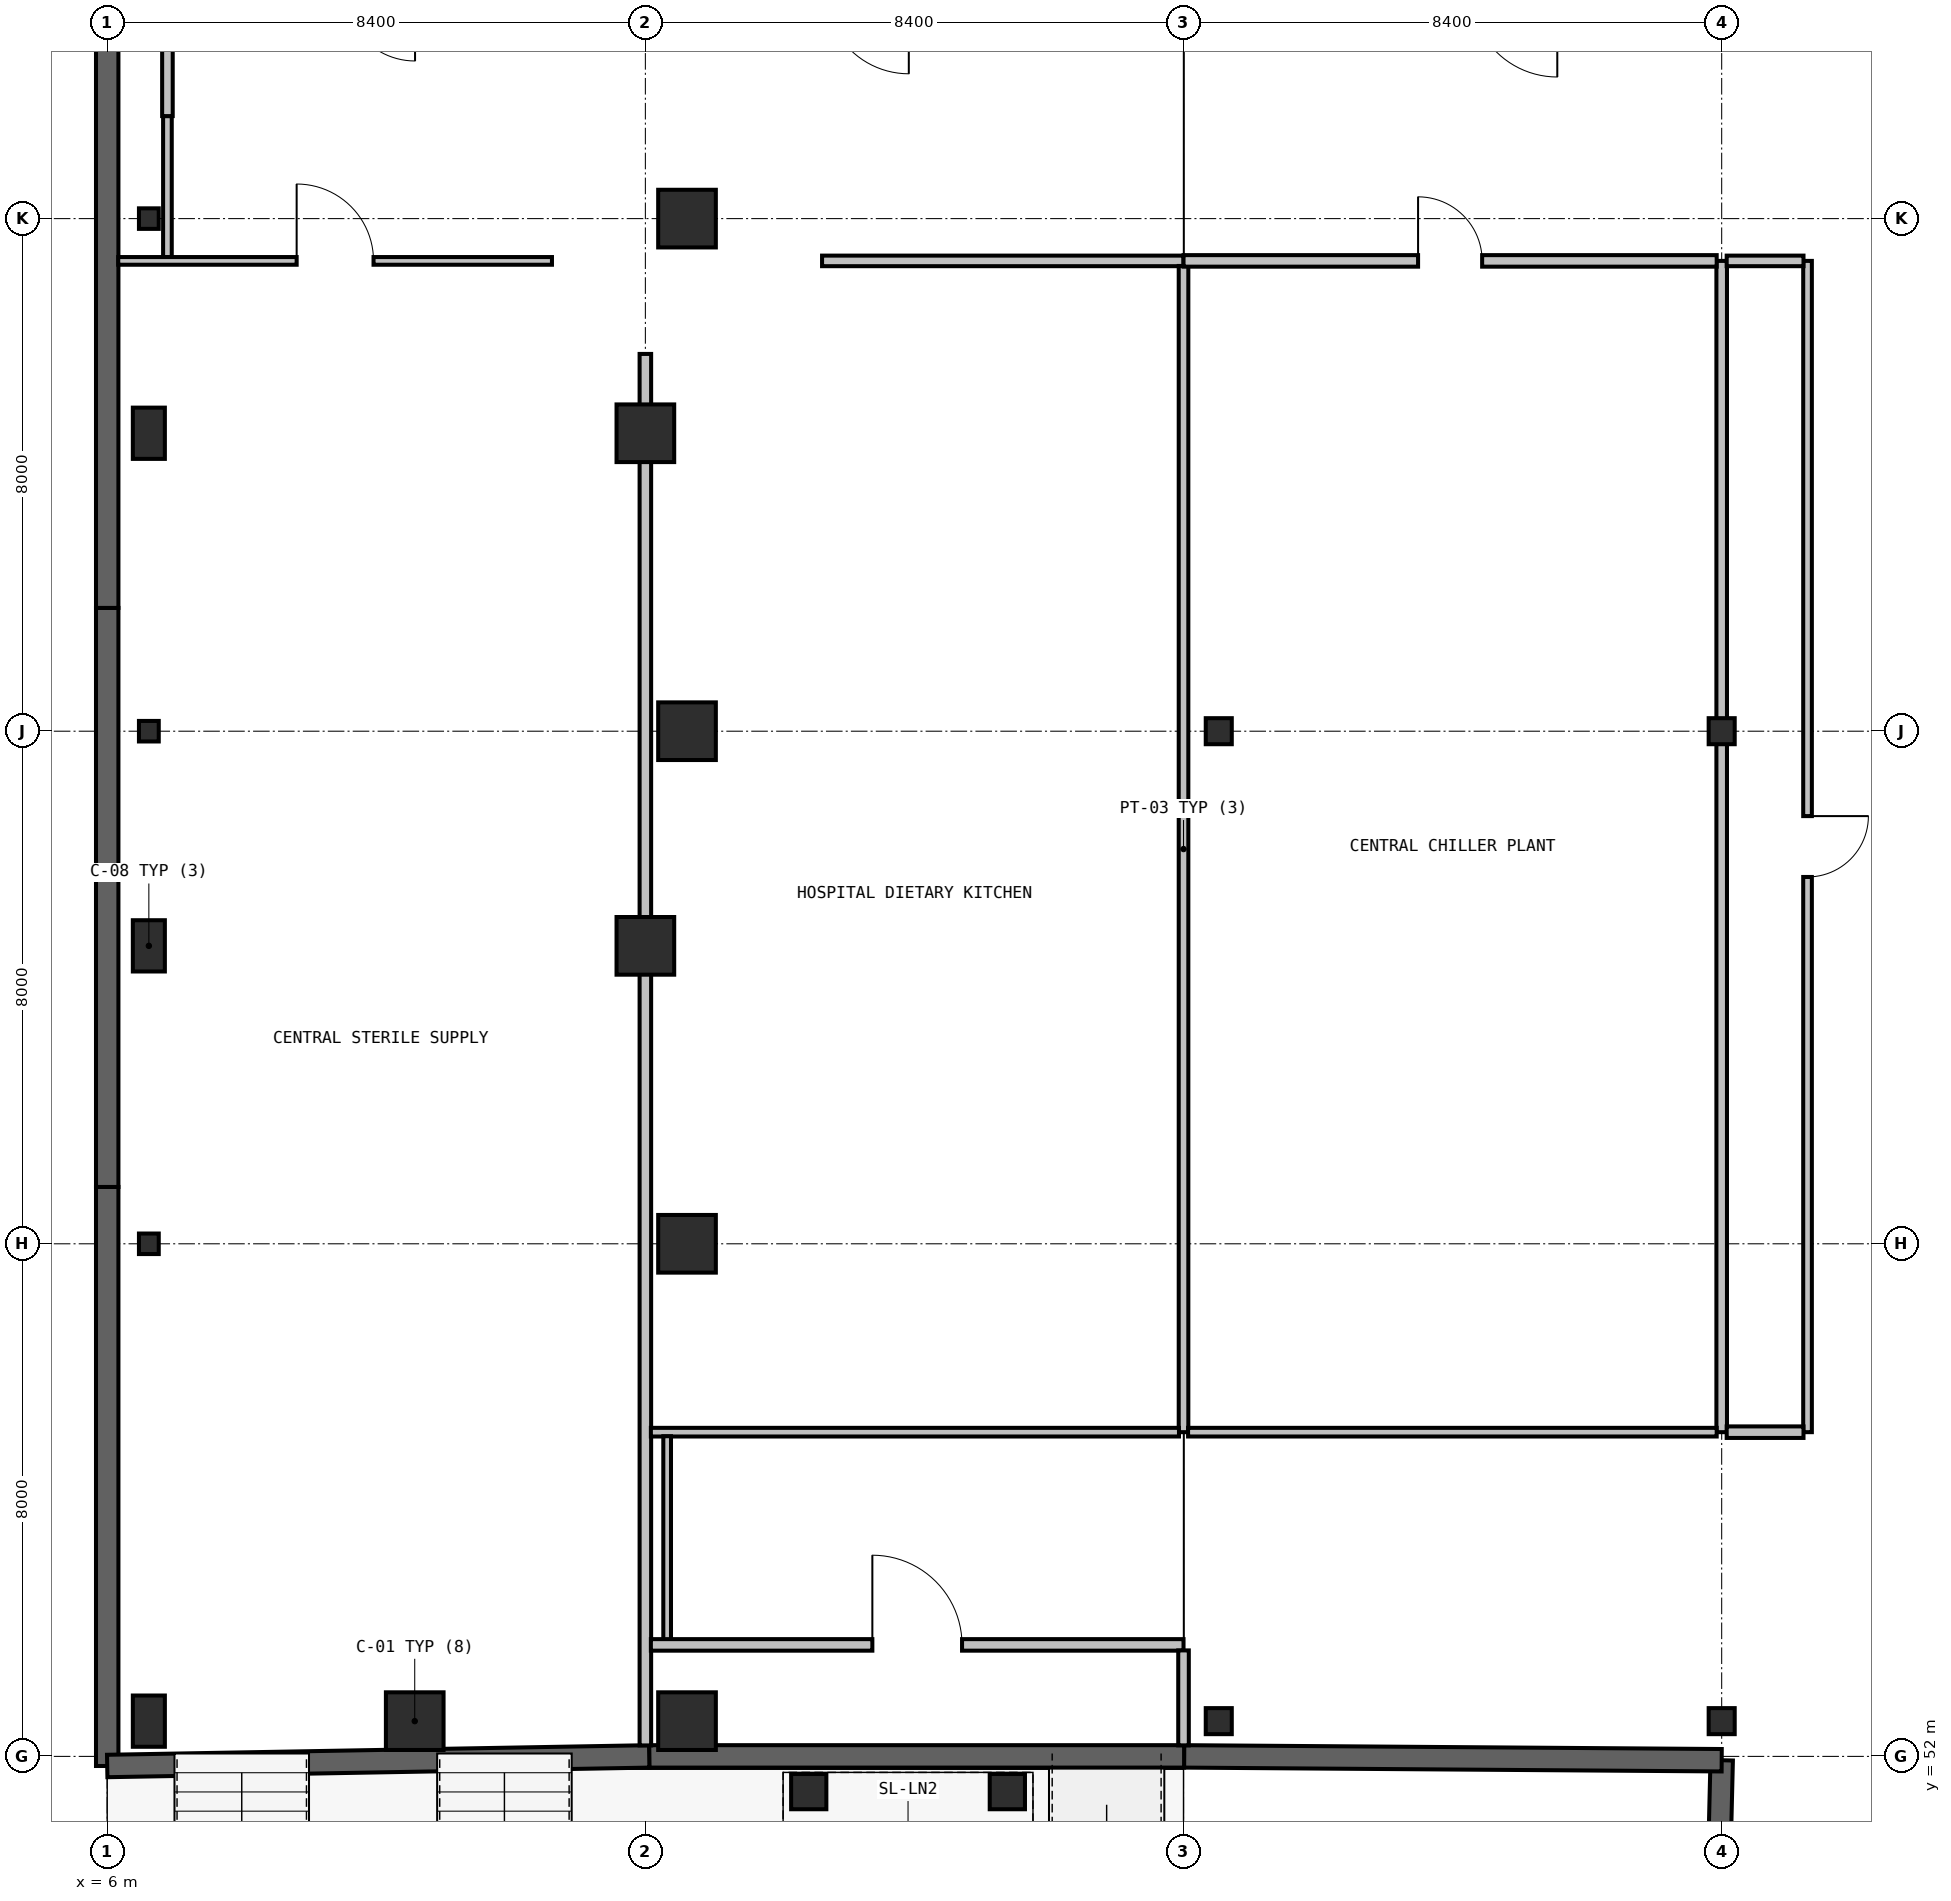
"""IFC4 building model, lengths in metres.
Left out: names, types, materials, properties, quantities, classifications, styles, units other than length and angle.
Written with IfcOpenShell. Run it as: python <this file> out.ifc"""

import sys

from ifc_helpers import new_model, si_unit, direction, frame, frame_2d, origin, origin_2d, place, context, subcontext, project, spatial, rectangle, hollow_circle, i_section, extrude, element, fill, save


model = new_model("IFC4")
c1 = context("Model", 3, precision=1e-05, world=origin(), true_north=direction((0.0, 1.0)))
c2 = subcontext(c1, "Body", "Model", "MODEL_VIEW")
j1 = project(units=[si_unit("LENGTHUNIT", "METRE"), si_unit("PLANEANGLEUNIT", "RADIAN")], contexts=[c1])
p1 = place(None, origin())
s1 = spatial("IfcSite", under=j1, at=p1, CompositionType="ELEMENT")
p2 = place(p1, origin())
s2 = spatial("IfcBuilding", under=s1, at=p2, CompositionType="ELEMENT")
p3 = place(p2, frame((0.0, 0.0, -4.8)))
s3 = spatial("IfcBuildingStorey", under=s2, at=p3, CompositionType="ELEMENT", Elevation=-4.8)
for number, where, z_axis, x_axis in (
    (1, (23.35, 52.55, 0.0), (0.0, 0.0, 1.0), (1.0, 0.0, 0.0)),
    (2, (23.35, 68.0, 0.0), (0.0, 0.0, 1.0), (1.0, 0.0, 0.0)),
    (3, (31.2, 52.55, 0.0), (0.0, 0.0, 1.0), (1.0, 0.0, 0.0)),
    (4, (31.2, 68.0, 0.0), (0.0, 0.0, 1.0), (1.0, 0.0, 0.0)),
):
    element("IfcColumn", number, at=place(p3, frame(where, z_axis=z_axis, x_axis=x_axis)), inside=s3, PredefinedType="COLUMN", context=c2, shape_type="SweptSolid", body=[
        extrude(hollow_circle(Radius=0.203, WallThickness=0.016, at=origin_2d()), origin(), (0.0, 0.0, 1.0), 4.8),
    ])
p4 = place(p3, frame((15.05, 52.55, 0.0), z_axis=(0.0, 0.0, 1.0), x_axis=(1.0, 0.0, 0.0)))
e5 = element("IfcColumn", 5, at=p4, inside=s3, PredefinedType="COLUMN", context=c2, shape_type="SweptSolid", body=[
    extrude(rectangle(XDim=0.9, YDim=0.9, at=origin_2d()), origin(), (0.0, 0.0, 1.0), 4.8),
])
p5 = place(p3, frame((6.65, 60.0, 0.0), z_axis=(0.0, 0.0, 1.0), x_axis=(1.0, 0.0, 0.0)))
e6 = element("IfcColumn", 6, at=p5, inside=s3, PredefinedType="COLUMN", context=c2, shape_type="SweptSolid", body=[
    extrude(i_section(OverallWidth=0.309, OverallDepth=0.321, WebThickness=0.014, FlangeThickness=0.022, at=origin_2d()), origin(), (0.0, 0.0, 1.0), 4.8),
])
p6 = place(p3, frame((15.05, 60.0, 0.0), z_axis=(0.0, 0.0, 1.0), x_axis=(1.0, 0.0, 0.0)))
e7 = element("IfcColumn", 7, at=p6, inside=s3, PredefinedType="COLUMN", context=c2, shape_type="SweptSolid", body=[
    extrude(rectangle(XDim=0.9, YDim=0.9, at=origin_2d()), origin(), (0.0, 0.0, 1.0), 4.8),
])
p7 = place(p3, frame((6.65, 68.0, 0.0), z_axis=(0.0, 0.0, 1.0), x_axis=(1.0, 0.0, 0.0)))
e8 = element("IfcColumn", 8, at=p7, inside=s3, PredefinedType="COLUMN", context=c2, shape_type="SweptSolid", body=[
    extrude(i_section(OverallWidth=0.309, OverallDepth=0.321, WebThickness=0.014, FlangeThickness=0.022, at=origin_2d()), origin(), (0.0, 0.0, 1.0), 4.8),
])
p8 = place(p3, frame((15.05, 68.0, 0.0), z_axis=(0.0, 0.0, 1.0), x_axis=(1.0, 0.0, 0.0)))
e9 = element("IfcColumn", 9, at=p8, inside=s3, PredefinedType="COLUMN", context=c2, shape_type="SweptSolid", body=[
    extrude(rectangle(XDim=0.9, YDim=0.9, at=origin_2d()), origin(), (0.0, 0.0, 1.0), 4.8),
])
p9 = place(p3, frame((6.65, 76.0, 0.0), z_axis=(0.0, 0.0, 1.0), x_axis=(1.0, 0.0, 0.0)))
e10 = element("IfcColumn", 10, at=p9, inside=s3, PredefinedType="COLUMN", context=c2, shape_type="SweptSolid", body=[
    extrude(i_section(OverallWidth=0.309, OverallDepth=0.321, WebThickness=0.014, FlangeThickness=0.022, at=origin_2d()), origin(), (0.0, 0.0, 1.0), 4.8),
])
p10 = place(p3, frame((15.05, 76.0, 0.0), z_axis=(0.0, 0.0, 1.0), x_axis=(1.0, 0.0, 0.0)))
e11 = element("IfcColumn", 11, at=p10, inside=s3, PredefinedType="COLUMN", context=c2, shape_type="SweptSolid", body=[
    extrude(rectangle(XDim=0.9, YDim=0.9, at=origin_2d()), origin(), (0.0, 0.0, 1.0), 4.8),
])
p11 = place(p3, frame((6.65, 52.55, 0.0), z_axis=(0.0, 0.0, 1.0), x_axis=(1.0, 0.0, 0.0)))
e12 = element("IfcColumn", 12, at=p11, inside=s3, PredefinedType="COLUMN", context=c2, shape_type="SweptSolid", body=[
    extrude(rectangle(XDim=0.5, YDim=0.8, at=origin_2d()), origin(), (0.0, 0.0, 1.0), 4.555),
])
p12 = place(p3, frame((10.8, 52.55, 0.0), z_axis=(0.0, 0.0, 1.0), x_axis=(1.0, 0.0, 0.0)))
e13 = element("IfcColumn", 13, at=p12, inside=s3, PredefinedType="COLUMN", context=c2, shape_type="SweptSolid", body=[
    extrude(rectangle(XDim=0.9, YDim=0.9, at=origin_2d()), origin(), (0.0, 0.0, 1.0), 4.555),
])
for number, where, z_axis, x_axis in (
    (14, (16.95, 51.45, -0.245), (0.0, 0.0, 1.0), (1.0, 0.0, 0.0)),
    (15, (20.05, 51.45, -0.245), (0.0, 0.0, 1.0), (1.0, 0.0, 0.0)),
):
    element("IfcColumn", number, at=place(p3, frame(where, z_axis=z_axis, x_axis=x_axis)), inside=s3, PredefinedType="COLUMN", context=c2, shape_type="SweptSolid", body=[
        extrude(rectangle(XDim=0.55, YDim=0.55, at=origin_2d()), origin(), (0.0, 0.0, 1.0), 2.425),
    ])
for number, where, z_axis, x_axis in (
    (16, (6.65, 64.65, 0.0), (0.0, 0.0, 1.0), (1.0, 0.0, 0.0)),
    (17, (6.65, 72.65, 0.0), (0.0, 0.0, 1.0), (1.0, 0.0, 0.0)),
):
    element("IfcColumn", number, at=place(p3, frame(where, z_axis=z_axis, x_axis=x_axis)), inside=s3, PredefinedType="COLUMN", context=c2, shape_type="SweptSolid", body=[
        extrude(rectangle(XDim=0.5, YDim=0.8, at=origin_2d()), origin(), (0.0, 0.0, 1.0), 4.555),
    ])
for number, where, z_axis, x_axis in (
    (18, (14.4, 64.65, 0.0), (0.0, 0.0, 1.0), (1.0, 0.0, 0.0)),
    (19, (14.4, 72.65, 0.0), (0.0, 0.0, 1.0), (1.0, 0.0, 0.0)),
):
    element("IfcColumn", number, at=place(p3, frame(where, z_axis=z_axis, x_axis=x_axis)), inside=s3, PredefinedType="COLUMN", context=c2, shape_type="SweptSolid", body=[
        extrude(rectangle(XDim=0.9, YDim=0.9, at=origin_2d()), origin(), (0.0, 0.0, 1.0), 4.45),
    ])
p13 = place(p3, frame((6.0, 51.85, 0.0), z_axis=(0.0, 0.0, 1.0), x_axis=(0.0, 1.0, 0.0)))
e20 = element("IfcWall", 20, at=p13, inside=s3, PredefinedType="SHEAR", context=c2, shape_type="SweptSolid", body=[
    extrude(rectangle(XDim=9.037, YDim=0.35, at=frame_2d((4.519, 0.0))), origin(), (0.0, 0.0, 1.0), 4.45),
])
p14 = place(p3, frame((6.0, 60.887, 0.0), z_axis=(0.0, 0.0, 1.0), x_axis=(0.0, 1.0, 0.0)))
e21 = element("IfcWall", 21, at=p14, inside=s3, PredefinedType="SHEAR", context=c2, shape_type="SweptSolid", body=[
    extrude(rectangle(XDim=9.037, YDim=0.35, at=frame_2d((4.519, 0.0))), origin(), (0.0, 0.0, 1.0), 4.45),
])
p15 = place(p3, frame((6.0, 69.924, 0.0), z_axis=(0.0, 0.0, 1.0), x_axis=(0.0, 1.0, 0.0)))
e22 = element("IfcWall", 22, at=p15, inside=s3, PredefinedType="SHEAR", context=c2, shape_type="SweptSolid", body=[
    extrude(rectangle(XDim=9.038, YDim=0.35, at=frame_2d((4.519, 0.0))), origin(), (0.0, 0.0, 1.0), 4.45),
])
p16 = place(p3, frame((31.17, 50.697, 0.0), z_axis=(0.0, 0.0, 1.0), x_axis=(0.024153234526, 0.999708268077, 0.0)))
e23 = element("IfcWall", 23, at=p16, inside=s3, PredefinedType="SHEAR", context=c2, shape_type="SweptSolid", body=[
    extrude(rectangle(XDim=1.243, YDim=0.35, at=frame_2d((0.622, 0.0))), origin(), (0.0, 0.0, 1.0), 4.45),
])
p17 = place(p3, frame((31.2, 51.94, 0.0), z_axis=(0.0, 0.0, 1.0), x_axis=(-0.999974385273, 0.007157429625, 0.0)))
e24 = element("IfcWall", 24, at=p17, inside=s3, PredefinedType="SHEAR", context=c2, shape_type="SweptSolid", body=[
    extrude(rectangle(XDim=8.391, YDim=0.35, at=frame_2d((4.196, 0.0))), origin(), (0.0, 0.0, 1.0), 4.45),
])
p18 = place(p3, frame((22.809, 52.0, 0.0), z_axis=(0.0, 0.0, 1.0), x_axis=(-1.0, 0.0, 0.0)))
e25 = element("IfcWall", 25, at=p18, inside=s3, PredefinedType="SHEAR", context=c2, shape_type="SweptSolid", body=[
    extrude(rectangle(XDim=8.349, YDim=0.35, at=frame_2d((4.175, 0.0))), origin(), (0.0, 0.0, 1.0), 4.45),
])
p19 = place(p3, frame((14.46, 52.0, 0.0), z_axis=(0.0, 0.0, 1.0), x_axis=(-0.999843054855, -0.01771625406, 0.0)))
e26 = element("IfcWall", 26, at=p19, inside=s3, PredefinedType="SHEAR", context=c2, shape_type="SweptSolid", body=[
    extrude(rectangle(XDim=8.461, YDim=0.35, at=frame_2d((4.23, 0.0))), origin(), (0.0, 0.0, 1.0), 4.45),
])
p20 = place(p3, frame((6.94, 77.6, 0.0), z_axis=(0.0, 0.0, 1.0), x_axis=(0.0, -1.0, 0.0)))
e27 = element("IfcWall", 27, at=p20, inside=s3, PredefinedType="PARTITIONING", context=c2, shape_type="SweptSolid", body=[
    extrude(rectangle(XDim=2.2, YDim=0.135, at=frame_2d((1.1, 0.0))), origin(), (0.0, 0.0, 1.0), 4.45),
])
p21 = place(p3, frame((6.172, 75.34, 0.0), z_axis=(0.0, 0.0, 1.0), x_axis=(1.0, 0.0, 0.0)))
e28 = element("IfcWall", 28, at=p21, inside=s3, PredefinedType="PARTITIONING", context=c2, shape_type="SweptSolid", body=[
    extrude(rectangle(XDim=6.77, YDim=0.12, at=frame_2d((3.385, 0.0))), origin(), (0.0, 0.0, 1.0), 4.45),
])
p22 = place(p21, frame((2.785, 0.0, 0.0)))
e29 = element("IfcOpeningElement", 29, at=p22, cuts=e28, PredefinedType="OPENING", context=c2, shape_type="SweptSolid", body=[
    extrude(rectangle(XDim=1.2, YDim=2.15, at=frame_2d((0.6, 1.075))), frame((0.0, 0.07, 0.0), z_axis=(0.0, -1.0, 0.0), x_axis=(1.0, 0.0, 0.0)), (0.0, 0.0, 1.0), 0.14),
])
p23 = place(p3, frame((14.4, 73.888, 0.0), z_axis=(0.0, 0.0, 1.0), x_axis=(0.0, -1.0, 0.0)))
e30 = element("IfcWall", 30, at=p23, inside=s3, PredefinedType="PARTITIONING", context=c2, shape_type="SweptSolid", body=[
    extrude(rectangle(XDim=21.717, YDim=0.18, at=frame_2d((10.858, 0.0))), origin(), (0.0, 0.0, 1.0), 4.45),
])
p24 = place(p3, frame((17.158, 75.34, 0.0), z_axis=(0.0, 0.0, 1.0), x_axis=(1.0, 0.0, 0.0)))
e31 = element("IfcWall", 31, at=p24, inside=s3, PredefinedType="PARTITIONING", context=c2, shape_type="SweptSolid", body=[
    extrude(rectangle(XDim=5.642, YDim=0.165, at=frame_2d((2.821, 0.0))), origin(), (0.0, 0.0, 1.0), 4.45),
])
p25 = place(p3, frame((22.8, 75.261, 0.0), z_axis=(0.0, 0.0, 1.0), x_axis=(0.0, -1.0, 0.0)))
e32 = element("IfcWall", 32, at=p25, inside=s3, PredefinedType="PARTITIONING", context=c2, shape_type="SweptSolid", body=[
    extrude(rectangle(XDim=18.201, YDim=0.15, at=frame_2d((9.101, 0.0))), origin(), (0.0, 0.0, 1.0), 4.45),
])
p26 = place(p3, frame((22.729, 57.06, 0.0), z_axis=(0.0, 0.0, 1.0), x_axis=(-1.0, 0.0, 0.0)))
e33 = element("IfcWall", 33, at=p26, inside=s3, PredefinedType="PARTITIONING", context=c2, shape_type="SweptSolid", body=[
    extrude(rectangle(XDim=8.243, YDim=0.135, at=frame_2d((4.122, 0.0))), origin(), (0.0, 0.0, 1.0), 4.45),
])
p27 = place(p3, frame((14.74, 56.997, 0.0), z_axis=(0.0, 0.0, 1.0), x_axis=(0.0, -1.0, 0.0)))
e34 = element("IfcWall", 34, at=p27, inside=s3, PredefinedType="PARTITIONING", context=c2, shape_type="SweptSolid", body=[
    extrude(rectangle(XDim=3.197, YDim=0.12, at=frame_2d((1.599, 0.0))), origin(), (0.0, 0.0, 1.0), 4.45),
])
p28 = place(p3, frame((14.486, 53.74, 0.0), z_axis=(0.0, 0.0, 1.0), x_axis=(1.0, 0.0, 0.0)))
e35 = element("IfcWall", 35, at=p28, inside=s3, PredefinedType="PARTITIONING", context=c2, shape_type="SweptSolid", body=[
    extrude(rectangle(XDim=8.314, YDim=0.18, at=frame_2d((4.157, 0.0))), origin(), (0.0, 0.0, 1.0), 4.45),
])
p29 = place(p28, frame((3.457, 0.0, 0.0)))
e36 = element("IfcOpeningElement", 36, at=p29, cuts=e35, PredefinedType="OPENING", context=c2, shape_type="SweptSolid", body=[
    extrude(rectangle(XDim=1.4, YDim=2.15, at=frame_2d((0.7, 1.075))), frame((0.0, 0.1, 0.0), z_axis=(0.0, -1.0, 0.0), x_axis=(1.0, 0.0, 0.0)), (0.0, 0.0, 1.0), 0.2),
])
p30 = place(p3, frame((22.8, 53.654, 0.0), z_axis=(0.0, 0.0, 1.0), x_axis=(0.0, -1.0, 0.0)))
e37 = element("IfcWall", 37, at=p30, inside=s3, PredefinedType="PARTITIONING", context=c2, shape_type="SweptSolid", body=[
    extrude(rectangle(XDim=1.482, YDim=0.165, at=frame_2d((0.741, 0.0))), origin(), (0.0, 0.0, 1.0), 4.45),
])
p31 = place(p3, frame((31.2, 75.34, 0.0), z_axis=(0.0, 0.0, 1.0), x_axis=(0.0, -1.0, 0.0)))
e38 = element("IfcWall", 38, at=p31, inside=s3, PredefinedType="PARTITIONING", context=c2, shape_type="SweptSolid", body=[
    extrude(rectangle(XDim=18.28, YDim=0.165, at=frame_2d((9.14, 0.0))), origin(), (0.0, 0.0, 1.0), 3.7),
])
p32 = place(p3, frame((31.122, 57.06, 0.0), z_axis=(0.0, 0.0, 1.0), x_axis=(-1.0, 0.0, 0.0)))
e39 = element("IfcWall", 39, at=p32, inside=s3, PredefinedType="PARTITIONING", context=c2, shape_type="SweptSolid", body=[
    extrude(rectangle(XDim=8.251, YDim=0.135, at=frame_2d((4.125, 0.0))), origin(), (0.0, 0.0, 1.0), 4.45),
])
p33 = place(p3, frame((22.8, 75.34, 0.0), z_axis=(0.0, 0.0, 1.0), x_axis=(1.0, 0.0, 0.0)))
e40 = element("IfcWall", 40, at=p33, inside=s3, PredefinedType="PARTITIONING", context=c2, shape_type="SweptSolid", body=[
    extrude(rectangle(XDim=8.322, YDim=0.18, at=frame_2d((4.161, 0.0))), origin(), (0.0, 0.0, 1.0), 4.45),
])
p34 = place(p33, frame((3.661, 0.0, 0.0)))
e41 = element("IfcOpeningElement", 41, at=p34, cuts=e40, PredefinedType="OPENING", context=c2, shape_type="SweptSolid", body=[
    extrude(rectangle(XDim=1.0, YDim=2.15, at=frame_2d((0.5, 1.075))), frame((0.0, 0.1, 0.0), z_axis=(0.0, -1.0, 0.0), x_axis=(1.0, 0.0, 0.0)), (0.0, 0.0, 1.0), 0.2),
])
p35 = place(p3, frame((32.54, 75.34, 0.0), z_axis=(0.0, 0.0, 1.0), x_axis=(0.0, -1.0, 0.0)))
e42 = element("IfcWall", 42, at=p35, inside=s3, PredefinedType="PARTITIONING", context=c2, shape_type="SweptSolid", body=[
    extrude(rectangle(XDim=18.28, YDim=0.135, at=frame_2d((9.14, 0.0))), origin(), (0.0, 0.0, 1.0), 4.45),
])
p36 = place(p35, frame((8.665, 0.0, 0.0)))
e43 = element("IfcOpeningElement", 43, at=p36, cuts=e42, PredefinedType="OPENING", context=c2, shape_type="SweptSolid", body=[
    extrude(rectangle(XDim=0.95, YDim=2.1, at=frame_2d((0.475, 1.05))), frame((0.0, 0.077, 0.0), z_axis=(0.0, -1.0, 0.0), x_axis=(1.0, 0.0, 0.0)), (0.0, 0.0, 1.0), 0.155),
])
p37 = place(p3, frame((32.477, 57.06, 0.0), z_axis=(0.0, 0.0, 1.0), x_axis=(-1.0, 0.0, 0.0)))
e44 = element("IfcWall", 44, at=p37, inside=s3, PredefinedType="PARTITIONING", context=c2, shape_type="SweptSolid", body=[
    extrude(rectangle(XDim=1.199, YDim=0.18, at=frame_2d((0.6, 0.0))), origin(), (0.0, 0.0, 1.0), 4.45),
])
p38 = place(p3, frame((31.278, 75.34, 0.0), z_axis=(0.0, 0.0, 1.0), x_axis=(1.0, 0.0, 0.0)))
e45 = element("IfcWall", 45, at=p38, inside=s3, PredefinedType="PARTITIONING", context=c2, shape_type="SweptSolid", body=[
    extrude(rectangle(XDim=1.199, YDim=0.165, at=frame_2d((0.6, 0.0))), origin(), (0.0, 0.0, 1.0), 4.45),
])
p39 = place(p3, frame((6.94, 79.474, 0.0), z_axis=(0.0, 0.0, 1.0), x_axis=(0.0, -1.0, 0.0)))
e46 = element("IfcWall", 46, at=p39, inside=s3, PredefinedType="PARTITIONING", context=c2, shape_type="SweptSolid", body=[
    extrude(rectangle(XDim=1.874, YDim=0.165, at=frame_2d((0.937, 0.0))), origin(), (0.0, 0.0, 1.0), 4.45),
])
p40 = place(p22, origin())
e47 = element("IfcDoor", 47, at=p40, inside=s3, OperationType="SINGLE_SWING_LEFT", PredefinedType="DOOR", context=c2, shape_type="SweptSolid", body=[
    extrude(rectangle(XDim=1.2, YDim=2.15, at=frame_2d((0.6, 1.075))), frame((0.0, 0.025, 0.0), z_axis=(0.0, -1.0, 0.0), x_axis=(1.0, 0.0, 0.0)), (0.0, 0.0, 1.0), 0.05),
])
fill(e29, e47)
p41 = place(p29, origin())
e48 = element("IfcDoor", 48, at=p41, inside=s3, OperationType="SINGLE_SWING_RIGHT", PredefinedType="DOOR", context=c2, shape_type="SweptSolid", body=[
    extrude(rectangle(XDim=1.4, YDim=2.15, at=frame_2d((0.7, 1.075))), frame((0.0, 0.025, 0.0), z_axis=(0.0, -1.0, 0.0), x_axis=(1.0, 0.0, 0.0)), (0.0, 0.0, 1.0), 0.05),
])
fill(e36, e48)
p42 = place(p34, origin())
e49 = element("IfcDoor", 49, at=p42, inside=s3, OperationType="SINGLE_SWING_RIGHT", PredefinedType="DOOR", context=c2, shape_type="SweptSolid", body=[
    extrude(rectangle(XDim=1.0, YDim=2.15, at=frame_2d((0.5, 1.075))), frame((0.0, 0.025, 0.0), z_axis=(0.0, -1.0, 0.0), x_axis=(1.0, 0.0, 0.0)), (0.0, 0.0, 1.0), 0.05),
])
fill(e41, e49)
p43 = place(p36, origin())
e50 = element("IfcDoor", 50, at=p43, inside=s3, OperationType="SINGLE_SWING_RIGHT", PredefinedType="DOOR", context=c2, shape_type="SweptSolid", body=[
    extrude(rectangle(XDim=0.95, YDim=2.1, at=frame_2d((0.475, 1.05))), frame((0.0, 0.025, 0.0), z_axis=(0.0, -1.0, 0.0), x_axis=(1.0, 0.0, 0.0)), (0.0, 0.0, 1.0), 0.05),
])
fill(e43, e50)
save(model, sys.argv[1])
